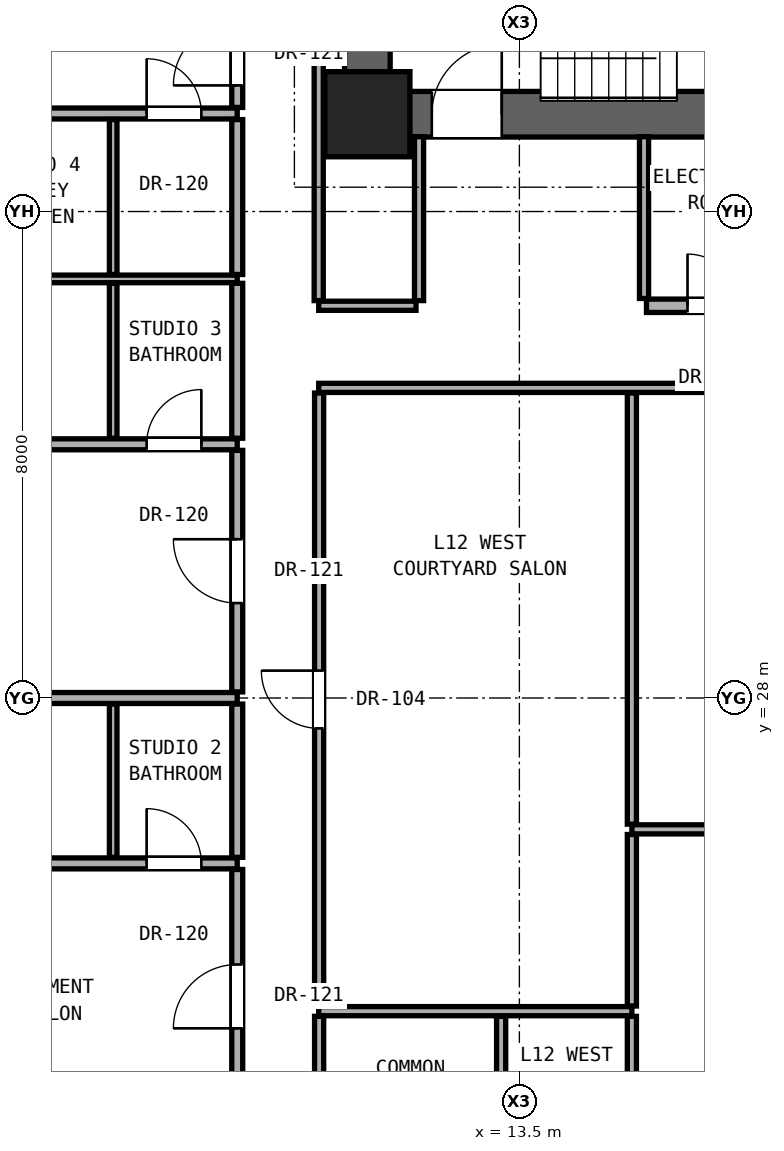
"""IFC4 building model, lengths in metres.
Left out: names, types, materials, properties, quantities, classifications, styles, units other than length and angle.
Written with IfcOpenShell. Run it as: python <this file> out.ifc"""

import sys

from ifc_helpers import new_model, si_unit, direction, frame, frame_2d, origin, origin_2d, place, context, subcontext, project, spatial, rectangle, extrude, element, fill, save


model = new_model("IFC4")
c1 = context("Model", 3, precision=1e-05, world=origin(), true_north=direction((0.0, 1.0)))
c2 = subcontext(c1, "Body", "Model", "MODEL_VIEW")
j1 = project(units=[si_unit("LENGTHUNIT", "METRE"), si_unit("PLANEANGLEUNIT", "RADIAN")], contexts=[c1])
p1 = place(None, origin())
s1 = spatial("IfcSite", under=j1, at=p1, CompositionType="ELEMENT")
p2 = place(p1, origin())
s2 = spatial("IfcBuilding", under=s1, at=p2, CompositionType="ELEMENT")
p3 = place(p2, frame((0.0, 0.0, 45.5)))
s3 = spatial("IfcBuildingStorey", under=s2, at=p3, CompositionType="ELEMENT", Elevation=45.5)
p4 = place(p3, frame((11.0, 37.6, 0.0), z_axis=(0.0, 0.0, 1.0), x_axis=(1.0, 0.0, 0.0)))
e1 = element("IfcColumn", 1, at=p4, inside=s3, PredefinedType="COLUMN", context=c2, shape_type="SweptSolid", body=[
    extrude(rectangle(XDim=1.4, YDim=1.4, at=origin_2d()), origin(), (0.0, 0.0, 1.0), 3.3),
])
p5 = place(p3, frame((11.0, 37.6, 0.0), z_axis=(0.0, 0.0, 1.0), x_axis=(0.0, 1.0, 0.0)))
e2 = element("IfcWall", 2, at=p5, inside=s3, PredefinedType="SHEAR", context=c2, shape_type="SweptSolid", body=[
    extrude(rectangle(XDim=6.0, YDim=0.75, at=frame_2d((3.0, 0.0))), origin(), (0.0, 0.0, 1.0), 3.06),
])
p6 = place(p3, frame((11.0, 37.6, 0.0), z_axis=(0.0, 0.0, 1.0), x_axis=(1.0, 0.0, 0.0)))
e3 = element("IfcWall", 3, at=p6, inside=s3, PredefinedType="SHEAR", context=c2, shape_type="SweptSolid", body=[
    extrude(rectangle(XDim=19.0, YDim=0.75, at=frame_2d((9.5, 0.0))), origin(), (0.0, 0.0, 1.0), 3.06),
])
p7 = place(p6, frame((1.06, 0.0, 0.0)))
e4 = element("IfcOpeningElement", 4, at=p7, cuts=e3, PredefinedType="OPENING", context=c2, shape_type="SweptSolid", body=[
    extrude(rectangle(XDim=1.15, YDim=2.2, at=frame_2d((0.575, 1.1))), frame((0.0, 0.385, 0.0), z_axis=(0.0, -1.0, 0.0), x_axis=(1.0, 0.0, 0.0)), (0.0, 0.0, 1.0), 0.77),
])
p8 = place(p6, frame((9.55, 0.0, 0.0)))
e5 = element("IfcOpeningElement", 5, at=p8, cuts=e3, PredefinedType="OPENING", context=c2, shape_type="SweptSolid", body=[
    extrude(rectangle(XDim=1.4, YDim=2.35, at=frame_2d((0.7, 1.175))), frame((0.0, 0.385, 0.0), z_axis=(0.0, -1.0, 0.0), x_axis=(1.0, 0.0, 0.0)), (0.0, 0.0, 1.0), 0.77),
])
p9 = place(p6, frame((11.95, 0.0, 0.0)))
e6 = element("IfcOpeningElement", 6, at=p9, cuts=e3, PredefinedType="OPENING", context=c2, shape_type="SweptSolid", body=[
    extrude(rectangle(XDim=1.4, YDim=2.35, at=frame_2d((0.7, 1.175))), frame((0.0, 0.385, 0.0), z_axis=(0.0, -1.0, 0.0), x_axis=(1.0, 0.0, 0.0)), (0.0, 0.0, 1.0), 0.77),
])
p10 = place(p6, frame((14.4, 0.0, 0.0)))
e7 = element("IfcOpeningElement", 7, at=p10, cuts=e3, PredefinedType="OPENING", context=c2, shape_type="SweptSolid", body=[
    extrude(rectangle(XDim=1.3, YDim=2.3, at=frame_2d((0.65, 1.15))), frame((0.0, 0.385, 0.0), z_axis=(0.0, -1.0, 0.0), x_axis=(1.0, 0.0, 0.0)), (0.0, 0.0, 1.0), 0.77),
])
p11 = place(p6, frame((16.6, 0.0, 0.0)))
e8 = element("IfcOpeningElement", 8, at=p11, cuts=e3, PredefinedType="OPENING", context=c2, shape_type="SweptSolid", body=[
    extrude(rectangle(XDim=1.3, YDim=2.3, at=frame_2d((0.65, 1.15))), frame((0.0, 0.385, 0.0), z_axis=(0.0, -1.0, 0.0), x_axis=(1.0, 0.0, 0.0)), (0.0, 0.0, 1.0), 0.77),
])
p12 = place(p3, frame((10.2, 22.85, 0.0), z_axis=(0.0, 0.0, 1.0), x_axis=(1.0, 0.0, 0.0)))
e9 = element("IfcWall", 9, at=p12, inside=s3, PredefinedType="PARTITIONING", context=c2, shape_type="SweptSolid", body=[
    extrude(rectangle(XDim=5.15, YDim=0.15, at=frame_2d((2.575, 0.0))), origin(), (0.0, 0.0, 1.0), 2.104),
])
p13 = place(p3, frame((-2.44, 25.28, 0.0), z_axis=(0.0, 0.0, 1.0), x_axis=(1.0, 0.0, 0.0)))
e10 = element("IfcWall", 10, at=p13, inside=s3, PredefinedType="PARTITIONING", context=c2, shape_type="SweptSolid", body=[
    extrude(rectangle(XDim=11.3, YDim=0.18, at=frame_2d((5.65, 0.0))), origin(), (0.0, 0.0, 1.0), 2.125),
])
p14 = place(p13, frame((2.875, 0.0, 0.0)))
e11 = element("IfcOpeningElement", 11, at=p14, cuts=e10, PredefinedType="OPENING", context=c2, shape_type="SweptSolid", body=[
    extrude(rectangle(XDim=0.85, YDim=2.01, at=frame_2d((0.425, 1.005))), frame((0.0, 0.1, 0.0), z_axis=(0.0, -1.0, 0.0), x_axis=(1.0, 0.0, 0.0)), (0.0, 0.0, 1.0), 0.2),
])
p15 = place(p13, frame((9.81, 0.0, 0.0)))
e12 = element("IfcOpeningElement", 12, at=p15, cuts=e10, PredefinedType="OPENING", context=c2, shape_type="SweptSolid", body=[
    extrude(rectangle(XDim=0.9, YDim=2.1, at=frame_2d((0.45, 1.05))), frame((0.0, 0.1, 0.0), z_axis=(0.0, -1.0, 0.0), x_axis=(1.0, 0.0, 0.0)), (0.0, 0.0, 1.0), 0.2),
])
p16 = place(p3, frame((15.35, 25.84, 0.0), z_axis=(0.0, 0.0, 1.0), x_axis=(1.0, 0.0, 0.0)))
e13 = element("IfcWall", 13, at=p16, inside=s3, PredefinedType="PARTITIONING", context=c2, shape_type="SweptSolid", body=[
    extrude(rectangle(XDim=15.45, YDim=0.15, at=frame_2d((7.725, 0.0))), origin(), (0.0, 0.0, 1.0), 2.104),
])
p17 = place(p3, frame((-2.44, 28.0, 0.0), z_axis=(0.0, 0.0, 1.0), x_axis=(1.0, 0.0, 0.0)))
e14 = element("IfcWall", 14, at=p17, inside=s3, PredefinedType="PARTITIONING", context=c2, shape_type="SweptSolid", body=[
    extrude(rectangle(XDim=11.3, YDim=0.18, at=frame_2d((5.65, 0.0))), origin(), (0.0, 0.0, 1.0), 2.125),
])
p18 = place(p3, frame((-2.44, 32.172, 0.0), z_axis=(0.0, 0.0, 1.0), x_axis=(1.0, 0.0, 0.0)))
e15 = element("IfcWall", 15, at=p18, inside=s3, PredefinedType="PARTITIONING", context=c2, shape_type="SweptSolid", body=[
    extrude(rectangle(XDim=11.3, YDim=0.18, at=frame_2d((5.65, 0.0))), origin(), (0.0, 0.0, 1.0), 2.125),
])
p19 = place(p18, frame((2.875, 0.0, 0.0)))
e16 = element("IfcOpeningElement", 16, at=p19, cuts=e15, PredefinedType="OPENING", context=c2, shape_type="SweptSolid", body=[
    extrude(rectangle(XDim=0.85, YDim=2.01, at=frame_2d((0.425, 1.005))), frame((0.0, 0.1, 0.0), z_axis=(0.0, -1.0, 0.0), x_axis=(1.0, 0.0, 0.0)), (0.0, 0.0, 1.0), 0.2),
])
p20 = place(p18, frame((9.81, 0.0, 0.0)))
e17 = element("IfcOpeningElement", 17, at=p20, cuts=e15, PredefinedType="OPENING", context=c2, shape_type="SweptSolid", body=[
    extrude(rectangle(XDim=0.9, YDim=2.1, at=frame_2d((0.45, 1.05))), frame((0.0, 0.1, 0.0), z_axis=(0.0, -1.0, 0.0), x_axis=(1.0, 0.0, 0.0)), (0.0, 0.0, 1.0), 0.2),
])
p21 = place(p3, frame((10.2, 33.1, 0.0), z_axis=(0.0, 0.0, 1.0), x_axis=(1.0, 0.0, 0.0)))
e18 = element("IfcWall", 18, at=p21, inside=s3, PredefinedType="PARTITIONING", context=c2, shape_type="SweptSolid", body=[
    extrude(rectangle(XDim=20.6, YDim=0.15, at=frame_2d((10.3, 0.0))), origin(), (0.0, 0.0, 1.0), 2.104),
])
p22 = place(p21, frame((9.051, 0.0, 0.0)))
e19 = element("IfcOpeningElement", 19, at=p22, cuts=e18, PredefinedType="OPENING", context=c2, shape_type="SweptSolid", body=[
    extrude(rectangle(XDim=0.85, YDim=2.01, at=frame_2d((0.425, 1.005))), frame((0.0, 0.085, 0.0), z_axis=(0.0, -1.0, 0.0), x_axis=(1.0, 0.0, 0.0)), (0.0, 0.0, 1.0), 0.17),
])
p23 = place(p21, frame((16.756, 0.0, 0.0)))
e20 = element("IfcOpeningElement", 20, at=p23, cuts=e18, PredefinedType="OPENING", context=c2, shape_type="SweptSolid", body=[
    extrude(rectangle(XDim=0.85, YDim=2.01, at=frame_2d((0.425, 1.005))), frame((0.0, 0.085, 0.0), z_axis=(0.0, -1.0, 0.0), x_axis=(1.0, 0.0, 0.0)), (0.0, 0.0, 1.0), 0.17),
])
p24 = place(p3, frame((10.2, 34.45, 0.0), z_axis=(0.0, 0.0, 1.0), x_axis=(1.0, 0.0, 0.0)))
e21 = element("IfcWall", 21, at=p24, inside=s3, PredefinedType="PARTITIONING", context=c2, shape_type="SweptSolid", body=[
    extrude(rectangle(XDim=1.6, YDim=0.15, at=frame_2d((0.8, 0.0))), origin(), (0.0, 0.0, 1.0), 2.104),
])
p25 = place(p3, frame((15.59, 34.45, 0.0), z_axis=(0.0, 0.0, 1.0), x_axis=(1.0, 0.0, 0.0)))
e22 = element("IfcWall", 22, at=p25, inside=s3, PredefinedType="SOLIDWALL", context=c2, shape_type="SweptSolid", body=[
    extrude(rectangle(XDim=15.21, YDim=0.22, at=frame_2d((7.605, 0.0))), origin(), (0.0, 0.0, 1.0), 2.104),
])
p26 = place(p25, frame((6.435, 0.0, 0.0)))
e23 = element("IfcOpeningElement", 23, at=p26, cuts=e22, PredefinedType="OPENING", context=c2, shape_type="SweptSolid", body=[
    extrude(rectangle(XDim=0.85, YDim=2.01, at=frame_2d((0.425, 1.005))), frame((0.0, 0.12, 0.0), z_axis=(0.0, -1.0, 0.0), x_axis=(1.0, 0.0, 0.0)), (0.0, 0.0, 1.0), 0.24),
])
p27 = place(p25, frame((11.135, 0.0, 0.0)))
e24 = element("IfcOpeningElement", 24, at=p27, cuts=e22, PredefinedType="OPENING", context=c2, shape_type="SweptSolid", body=[
    extrude(rectangle(XDim=0.85, YDim=2.01, at=frame_2d((0.425, 1.005))), frame((0.0, 0.12, 0.0), z_axis=(0.0, -1.0, 0.0), x_axis=(1.0, 0.0, 0.0)), (0.0, 0.0, 1.0), 0.24),
])
p28 = place(p25, frame((0.675, 0.0, 0.0)))
e25 = element("IfcOpeningElement", 25, at=p28, cuts=e22, PredefinedType="OPENING", context=c2, shape_type="SweptSolid", body=[
    extrude(rectangle(XDim=0.85, YDim=2.01, at=frame_2d((0.425, 1.005))), frame((0.0, 0.12, 0.0), z_axis=(0.0, -1.0, 0.0), x_axis=(1.0, 0.0, 0.0)), (0.0, 0.0, 1.0), 0.24),
])
p29 = place(p25, frame((2.835, 0.0, 0.0)))
e26 = element("IfcOpeningElement", 26, at=p29, cuts=e22, PredefinedType="OPENING", context=c2, shape_type="SweptSolid", body=[
    extrude(rectangle(XDim=0.85, YDim=2.01, at=frame_2d((0.425, 1.005))), frame((0.0, 0.12, 0.0), z_axis=(0.0, -1.0, 0.0), x_axis=(1.0, 0.0, 0.0)), (0.0, 0.0, 1.0), 0.24),
])
p30 = place(p3, frame((-2.44, 34.892, 0.0), z_axis=(0.0, 0.0, 1.0), x_axis=(1.0, 0.0, 0.0)))
e27 = element("IfcWall", 27, at=p30, inside=s3, PredefinedType="PARTITIONING", context=c2, shape_type="SweptSolid", body=[
    extrude(rectangle(XDim=11.3, YDim=0.125, at=frame_2d((5.65, 0.0))), origin(), (0.0, 0.0, 1.0), 2.125),
])
p31 = place(p3, frame((-2.44, 37.612, 0.0), z_axis=(0.0, 0.0, 1.0), x_axis=(1.0, 0.0, 0.0)))
e28 = element("IfcWall", 28, at=p31, inside=s3, PredefinedType="PARTITIONING", context=c2, shape_type="SweptSolid", body=[
    extrude(rectangle(XDim=11.3, YDim=0.18, at=frame_2d((5.65, 0.0))), origin(), (0.0, 0.0, 1.0), 2.125),
])
p32 = place(p31, frame((2.875, 0.0, 0.0)))
e29 = element("IfcOpeningElement", 29, at=p32, cuts=e28, PredefinedType="OPENING", context=c2, shape_type="SweptSolid", body=[
    extrude(rectangle(XDim=0.85, YDim=2.01, at=frame_2d((0.425, 1.005))), frame((0.0, 0.1, 0.0), z_axis=(0.0, -1.0, 0.0), x_axis=(1.0, 0.0, 0.0)), (0.0, 0.0, 1.0), 0.2),
])
p33 = place(p31, frame((9.81, 0.0, 0.0)))
e30 = element("IfcOpeningElement", 30, at=p33, cuts=e28, PredefinedType="OPENING", context=c2, shape_type="SweptSolid", body=[
    extrude(rectangle(XDim=0.9, YDim=2.1, at=frame_2d((0.45, 1.05))), frame((0.0, 0.1, 0.0), z_axis=(0.0, -1.0, 0.0), x_axis=(1.0, 0.0, 0.0)), (0.0, 0.0, 1.0), 0.2),
])
p34 = place(p3, frame((6.82, 25.38, 0.0), z_axis=(0.0, 0.0, 1.0), x_axis=(0.0, 1.0, 0.0)))
e31 = element("IfcWall", 31, at=p34, inside=s3, PredefinedType="PARTITIONING", context=c2, shape_type="SweptSolid", body=[
    extrude(rectangle(XDim=2.52, YDim=0.125, at=frame_2d((1.26, 0.0))), origin(), (0.0, 0.0, 1.0), 3.06),
])
p35 = place(p3, frame((6.82, 32.272, 0.0), z_axis=(0.0, 0.0, 1.0), x_axis=(0.0, 1.0, 0.0)))
e32 = element("IfcWall", 32, at=p35, inside=s3, PredefinedType="PARTITIONING", context=c2, shape_type="SweptSolid", body=[
    extrude(rectangle(XDim=2.548, YDim=0.125, at=frame_2d((1.274, 0.0))), origin(), (0.0, 0.0, 1.0), 3.06),
])
p36 = place(p3, frame((6.82, 34.965, 0.0), z_axis=(0.0, 0.0, 1.0), x_axis=(0.0, 1.0, 0.0)))
e33 = element("IfcWall", 33, at=p36, inside=s3, PredefinedType="PARTITIONING", context=c2, shape_type="SweptSolid", body=[
    extrude(rectangle(XDim=2.547, YDim=0.125, at=frame_2d((1.274, 0.0))), origin(), (0.0, 0.0, 1.0), 2.452),
])
p37 = place(p3, frame((8.86, 21.005, 0.0), z_axis=(0.0, 0.0, 1.0), x_axis=(0.0, 1.0, 0.0)))
e34 = element("IfcWall", 34, at=p37, inside=s3, PredefinedType="PARTITIONING", context=c2, shape_type="SweptSolid", body=[
    extrude(rectangle(XDim=4.175, YDim=0.18, at=frame_2d((2.087, 0.0))), origin(), (0.0, 0.0, 1.0), 2.279),
])
p38 = place(p37, frame((1.562, 0.0, 0.0)))
e35 = element("IfcOpeningElement", 35, at=p38, cuts=e34, PredefinedType="OPENING", context=c2, shape_type="SweptSolid", body=[
    extrude(rectangle(XDim=1.05, YDim=2.2, at=frame_2d((0.525, 1.1))), frame((0.0, 0.1, 0.0), z_axis=(0.0, -1.0, 0.0), x_axis=(1.0, 0.0, 0.0)), (0.0, 0.0, 1.0), 0.2),
])
p39 = place(p3, frame((8.86, 25.38, 0.0), z_axis=(0.0, 0.0, 1.0), x_axis=(0.0, 1.0, 0.0)))
e36 = element("IfcWall", 36, at=p39, inside=s3, PredefinedType="PARTITIONING", context=c2, shape_type="SweptSolid", body=[
    extrude(rectangle(XDim=2.52, YDim=0.18, at=frame_2d((1.26, 0.0))), origin(), (0.0, 0.0, 1.0), 3.06),
])
p40 = place(p3, frame((8.86, 28.1, 0.0), z_axis=(0.0, 0.0, 1.0), x_axis=(0.0, 1.0, 0.0)))
e37 = element("IfcWall", 37, at=p40, inside=s3, PredefinedType="PARTITIONING", context=c2, shape_type="SweptSolid", body=[
    extrude(rectangle(XDim=3.972, YDim=0.18, at=frame_2d((1.986, 0.0))), origin(), (0.0, 0.0, 1.0), 2.279),
])
p41 = place(p40, frame((1.461, 0.0, 0.0)))
e38 = element("IfcOpeningElement", 38, at=p41, cuts=e37, PredefinedType="OPENING", context=c2, shape_type="SweptSolid", body=[
    extrude(rectangle(XDim=1.05, YDim=2.2, at=frame_2d((0.525, 1.1))), frame((0.0, 0.1, 0.0), z_axis=(0.0, -1.0, 0.0), x_axis=(1.0, 0.0, 0.0)), (0.0, 0.0, 1.0), 0.2),
])
p42 = place(p3, frame((8.86, 32.272, 0.0), z_axis=(0.0, 0.0, 1.0), x_axis=(0.0, 1.0, 0.0)))
e39 = element("IfcWall", 39, at=p42, inside=s3, PredefinedType="PARTITIONING", context=c2, shape_type="SweptSolid", body=[
    extrude(rectangle(XDim=2.548, YDim=0.18, at=frame_2d((1.274, 0.0))), origin(), (0.0, 0.0, 1.0), 3.06),
])
p43 = place(p3, frame((8.86, 34.965, 0.0), z_axis=(0.0, 0.0, 1.0), x_axis=(0.0, 1.0, 0.0)))
e40 = element("IfcWall", 40, at=p43, inside=s3, PredefinedType="PARTITIONING", context=c2, shape_type="SweptSolid", body=[
    extrude(rectangle(XDim=2.547, YDim=0.18, at=frame_2d((1.274, 0.0))), origin(), (0.0, 0.0, 1.0), 2.452),
])
p44 = place(p3, frame((8.86, 37.712, 0.0), z_axis=(0.0, 0.0, 1.0), x_axis=(0.0, 1.0, 0.0)))
e41 = element("IfcWall", 41, at=p44, inside=s3, PredefinedType="PARTITIONING", context=c2, shape_type="SweptSolid", body=[
    extrude(rectangle(XDim=4.474, YDim=0.18, at=frame_2d((2.237, 0.0))), origin(), (0.0, 0.0, 1.0), 2.436),
])
p45 = place(p44, frame((0.362, 0.0, 0.0)))
e42 = element("IfcOpeningElement", 42, at=p45, cuts=e41, PredefinedType="OPENING", context=c2, shape_type="SweptSolid", body=[
    extrude(rectangle(XDim=1.05, YDim=2.2, at=frame_2d((0.525, 1.1))), frame((0.0, 0.1, 0.0), z_axis=(0.0, -1.0, 0.0), x_axis=(1.0, 0.0, 0.0)), (0.0, 0.0, 1.0), 0.2),
])
p46 = place(p3, frame((10.207, 19.985, 0.0), z_axis=(0.0, 0.0, 1.0), x_axis=(0.0, 1.0, 0.0)))
e43 = element("IfcWall", 43, at=p46, inside=s3, PredefinedType="PARTITIONING", context=c2, shape_type="SweptSolid", body=[
    extrude(rectangle(XDim=2.78, YDim=0.15, at=frame_2d((1.39, 0.0))), origin(), (0.0, 0.0, 1.0), 3.06),
])
p47 = place(p3, frame((10.207, 22.935, 0.0), z_axis=(0.0, 0.0, 1.0), x_axis=(0.0, 1.0, 0.0)))
e44 = element("IfcWall", 44, at=p47, inside=s3, PredefinedType="PARTITIONING", context=c2, shape_type="SweptSolid", body=[
    extrude(rectangle(XDim=10.08, YDim=0.15, at=frame_2d((5.04, 0.0))), origin(), (0.0, 0.0, 1.0), 2.279),
])
p48 = place(p47, frame((4.565, 0.0, 0.0)))
e45 = element("IfcOpeningElement", 45, at=p48, cuts=e44, PredefinedType="OPENING", context=c2, shape_type="SweptSolid", body=[
    extrude(rectangle(XDim=0.95, YDim=2.15, at=frame_2d((0.475, 1.075))), frame((0.0, 0.085, 0.0), z_axis=(0.0, -1.0, 0.0), x_axis=(1.0, 0.0, 0.0)), (0.0, 0.0, 1.0), 0.17),
])
p49 = place(p3, frame((10.2, 34.535, 0.0), z_axis=(0.0, 0.0, 1.0), x_axis=(0.0, 1.0, 0.0)))
e46 = element("IfcWall", 46, at=p49, inside=s3, PredefinedType="PARTITIONING", context=c2, shape_type="SweptSolid", body=[
    extrude(rectangle(XDim=9.13, YDim=0.15, at=frame_2d((4.565, 0.0))), origin(), (0.0, 0.0, 1.0), 2.436),
])
p50 = place(p3, frame((11.85, 34.535, 0.0), z_axis=(0.0, 0.0, 1.0), x_axis=(0.0, 1.0, 0.0)))
e47 = element("IfcWall", 47, at=p50, inside=s3, PredefinedType="PARTITIONING", context=c2, shape_type="SweptSolid", body=[
    extrude(rectangle(XDim=2.695, YDim=0.15, at=frame_2d((1.348, 0.0))), origin(), (0.0, 0.0, 1.0), 3.06),
])
for number, where, z_axis, x_axis in (
    (48, (13.2, 19.985, 0.0), (0.0, 0.0, 1.0), (0.0, 1.0, 0.0)),
    (49, (15.35, 19.985, 0.0), (0.0, 0.0, 1.0), (0.0, 1.0, 0.0)),
):
    element("IfcWall", number, at=place(p3, frame(where, z_axis=z_axis, x_axis=x_axis)), inside=s3, PredefinedType="PARTITIONING", context=c2, shape_type="SweptSolid", body=[
        extrude(rectangle(XDim=2.78, YDim=0.15, at=frame_2d((1.39, 0.0))), origin(), (0.0, 0.0, 1.0), 3.06),
    ])
p51 = place(p3, frame((15.35, 22.935, 0.0), z_axis=(0.0, 0.0, 1.0), x_axis=(0.0, 1.0, 0.0)))
e50 = element("IfcWall", 50, at=p51, inside=s3, PredefinedType="PARTITIONING", context=c2, shape_type="SweptSolid", body=[
    extrude(rectangle(XDim=2.82, YDim=0.15, at=frame_2d((1.41, 0.0))), origin(), (0.0, 0.0, 1.0), 2.104),
])
p52 = place(p3, frame((15.35, 25.925, 0.0), z_axis=(0.0, 0.0, 1.0), x_axis=(0.0, 1.0, 0.0)))
e51 = element("IfcWall", 51, at=p52, inside=s3, PredefinedType="PARTITIONING", context=c2, shape_type="SweptSolid", body=[
    extrude(rectangle(XDim=7.09, YDim=0.15, at=frame_2d((3.545, 0.0))), origin(), (0.0, 0.0, 1.0), 2.104),
])
p53 = place(p3, frame((15.55, 34.57, 0.0), z_axis=(0.0, 0.0, 1.0), x_axis=(0.0, 1.0, 0.0)))
e52 = element("IfcWall", 52, at=p53, inside=s3, PredefinedType="PARTITIONING", context=c2, shape_type="SweptSolid", body=[
    extrude(rectangle(XDim=2.66, YDim=0.15, at=frame_2d((1.33, 0.0))), origin(), (0.0, 0.0, 1.0), 2.589),
])
p54 = place(p7, origin())
e53 = element("IfcDoor", 53, at=p54, inside=s3, OperationType="SINGLE_SWING_RIGHT", PredefinedType="DOOR", context=c2, shape_type="SweptSolid", body=[
    extrude(rectangle(XDim=1.15, YDim=2.2, at=frame_2d((0.575, 1.1))), frame((0.0, 0.025, 0.0), z_axis=(0.0, -1.0, 0.0), x_axis=(1.0, 0.0, 0.0)), (0.0, 0.0, 1.0), 0.05),
])
fill(e4, e53)
p55 = place(p28, origin())
e54 = element("IfcDoor", 54, at=p55, inside=s3, OperationType="SINGLE_SWING_LEFT", PredefinedType="DOOR", context=c2, shape_type="SweptSolid", body=[
    extrude(rectangle(XDim=0.85, YDim=2.01, at=frame_2d((0.425, 1.005))), frame((0.0, 0.025, 0.0), z_axis=(0.0, -1.0, 0.0), x_axis=(1.0, 0.0, 0.0)), (0.0, 0.0, 1.0), 0.05),
])
fill(e25, e54)
p56 = place(p38, origin())
e55 = element("IfcDoor", 55, at=p56, inside=s3, OperationType="SINGLE_SWING_LEFT", PredefinedType="DOOR", context=c2, shape_type="SweptSolid", body=[
    extrude(rectangle(XDim=1.05, YDim=2.2, at=frame_2d((0.525, 1.1))), frame((0.0, 0.025, 0.0), z_axis=(0.0, -1.0, 0.0), x_axis=(1.0, 0.0, 0.0)), (0.0, 0.0, 1.0), 0.05),
])
fill(e35, e55)
p57 = place(p15, origin())
e56 = element("IfcDoor", 56, at=p57, inside=s3, OperationType="SINGLE_SWING_LEFT", PredefinedType="DOOR", context=c2, shape_type="SweptSolid", body=[
    extrude(rectangle(XDim=0.9, YDim=2.1, at=frame_2d((0.45, 1.05))), frame((0.0, 0.025, 0.0), z_axis=(0.0, -1.0, 0.0), x_axis=(1.0, 0.0, 0.0)), (0.0, 0.0, 1.0), 0.05),
])
fill(e12, e56)
p58 = place(p41, origin())
e57 = element("IfcDoor", 57, at=p58, inside=s3, OperationType="SINGLE_SWING_RIGHT", PredefinedType="DOOR", context=c2, shape_type="SweptSolid", body=[
    extrude(rectangle(XDim=1.05, YDim=2.2, at=frame_2d((0.525, 1.1))), frame((0.0, 0.025, 0.0), z_axis=(0.0, -1.0, 0.0), x_axis=(1.0, 0.0, 0.0)), (0.0, 0.0, 1.0), 0.05),
])
fill(e38, e57)
p59 = place(p20, origin())
e58 = element("IfcDoor", 58, at=p59, inside=s3, OperationType="SINGLE_SWING_RIGHT", PredefinedType="DOOR", context=c2, shape_type="SweptSolid", body=[
    extrude(rectangle(XDim=0.9, YDim=2.1, at=frame_2d((0.45, 1.05))), frame((0.0, 0.025, 0.0), z_axis=(0.0, -1.0, 0.0), x_axis=(1.0, 0.0, 0.0)), (0.0, 0.0, 1.0), 0.05),
])
fill(e17, e58)
p60 = place(p45, origin())
e59 = element("IfcDoor", 59, at=p60, inside=s3, OperationType="SINGLE_SWING_LEFT", PredefinedType="DOOR", context=c2, shape_type="SweptSolid", body=[
    extrude(rectangle(XDim=1.05, YDim=2.2, at=frame_2d((0.525, 1.1))), frame((0.0, 0.025, 0.0), z_axis=(0.0, -1.0, 0.0), x_axis=(1.0, 0.0, 0.0)), (0.0, 0.0, 1.0), 0.05),
])
fill(e42, e59)
p61 = place(p33, origin())
e60 = element("IfcDoor", 60, at=p61, inside=s3, OperationType="SINGLE_SWING_LEFT", PredefinedType="DOOR", context=c2, shape_type="SweptSolid", body=[
    extrude(rectangle(XDim=0.9, YDim=2.1, at=frame_2d((0.45, 1.05))), frame((0.0, 0.025, 0.0), z_axis=(0.0, -1.0, 0.0), x_axis=(1.0, 0.0, 0.0)), (0.0, 0.0, 1.0), 0.05),
])
fill(e30, e60)
p62 = place(p48, origin())
e61 = element("IfcDoor", 61, at=p62, inside=s3, OperationType="SINGLE_SWING_RIGHT", PredefinedType="DOOR", context=c2, shape_type="SweptSolid", body=[
    extrude(rectangle(XDim=0.95, YDim=2.15, at=frame_2d((0.475, 1.075))), frame((0.0, 0.025, 0.0), z_axis=(0.0, -1.0, 0.0), x_axis=(1.0, 0.0, 0.0)), (0.0, 0.0, 1.0), 0.05),
])
fill(e45, e61)
save(model, sys.argv[1])
